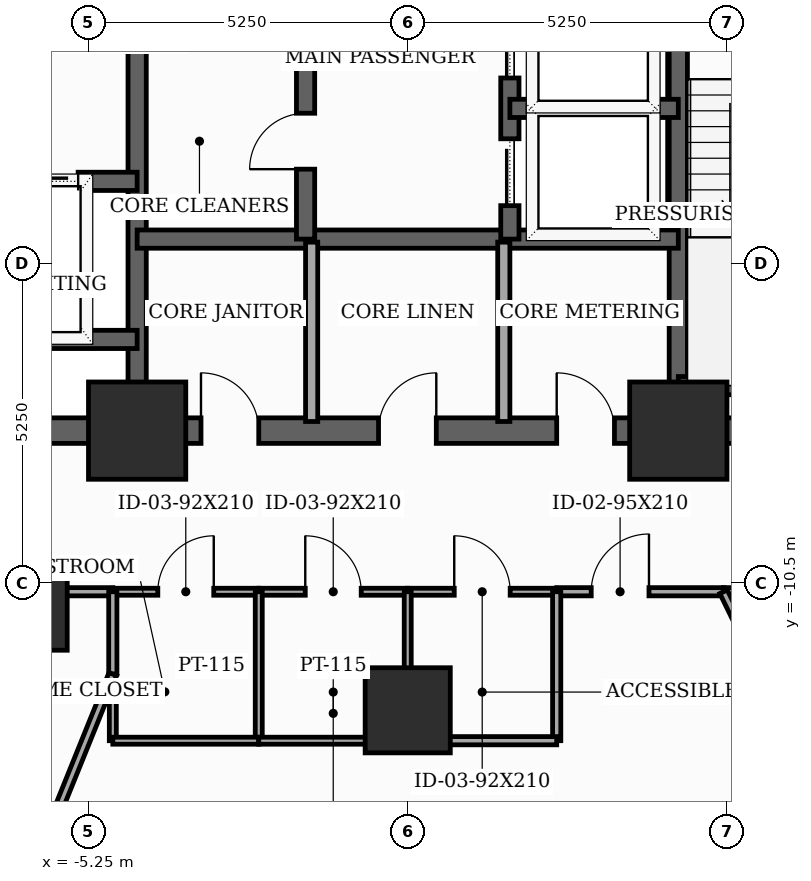
"""IFC4 building model, lengths in metres.
Left out: names, types, materials, properties, quantities, classifications, styles, units other than length and angle.
Written with IfcOpenShell. Run it as: python <this file> out.ifc"""

import sys

from ifc_helpers import new_model, si_unit, direction, frame, frame_2d, origin, origin_2d, place, context, subcontext, project, spatial, rectangle, extrude, element, fill, save


model = new_model("IFC4")
c1 = context("Model", 3, precision=1e-05, world=origin(), true_north=direction((0.0, 1.0)))
c2 = subcontext(c1, "Body", "Model", "MODEL_VIEW")
j1 = project(units=[si_unit("LENGTHUNIT", "METRE"), si_unit("PLANEANGLEUNIT", "RADIAN")], contexts=[c1])
p1 = place(None, origin())
s1 = spatial("IfcSite", under=j1, at=p1, CompositionType="ELEMENT")
p2 = place(p1, origin())
s2 = spatial("IfcBuilding", under=s1, at=p2, CompositionType="ELEMENT")
p3 = place(p2, frame((0.0, 0.0, 44.5)))
s3 = spatial("IfcBuildingStorey", under=s2, at=p3, CompositionType="ELEMENT", Elevation=44.5)
for number, where, z_axis, x_axis in (
    (1, (-4.45, -8.0, 0.0), (0.0, 0.0, 1.0), (1.0, 0.0, 0.0)),
    (2, (4.45, -8.0, 0.0), (0.0, 0.0, 1.0), (1.0, 0.0, 0.0)),
):
    element("IfcColumn", number, at=place(p3, frame(where, z_axis=z_axis, x_axis=x_axis)), inside=s3, PredefinedType="COLUMN", context=c2, shape_type="SweptSolid", body=[
        extrude(rectangle(XDim=1.6, YDim=1.6, at=origin_2d()), origin(), (0.0, 0.0, 1.0), 3.7),
    ])
for number, where, z_axis, x_axis in (
    (3, (-6.3, -10.912, 0.0), (0.0, 0.0, 1.0), (1.0, 0.0, 0.0)),
    (4, (0.0, -12.6, 0.0), (0.0, 0.0, 1.0), (1.0, 0.0, 0.0)),
):
    element("IfcColumn", number, at=place(p3, frame(where, z_axis=z_axis, x_axis=x_axis)), inside=s3, PredefinedType="COLUMN", context=c2, shape_type="SweptSolid", body=[
        extrude(rectangle(XDim=1.4, YDim=1.4, at=origin_2d()), origin(), (0.0, 0.0, 1.0), 3.7),
    ])
p4 = place(p3, frame((-8.0, -8.0, 0.0), z_axis=(0.0, 0.0, 1.0), x_axis=(1.0, 0.0, 0.0)))
e5 = element("IfcWall", 5, at=p4, inside=s3, PredefinedType="SHEAR", context=c2, shape_type="SweptSolid", body=[
    extrude(rectangle(XDim=16.0, YDim=0.42, at=frame_2d((8.0, 0.0))), origin(), (0.0, 0.0, 1.0), 3.5),
])
p5 = place(p4, frame((4.6, 0.0, 0.0)))
e6 = element("IfcOpeningElement", 6, at=p5, cuts=e5, PredefinedType="OPENING", context=c2, shape_type="SweptSolid", body=[
    extrude(rectangle(XDim=0.95, YDim=2.1, at=frame_2d((0.475, 1.05))), frame((0.0, 0.22, 0.0), z_axis=(0.0, -1.0, 0.0), x_axis=(1.0, 0.0, 0.0)), (0.0, 0.0, 1.0), 0.44),
])
p6 = place(p4, frame((7.52, 0.0, 0.0)))
e7 = element("IfcOpeningElement", 7, at=p6, cuts=e5, PredefinedType="OPENING", context=c2, shape_type="SweptSolid", body=[
    extrude(rectangle(XDim=0.95, YDim=2.1, at=frame_2d((0.475, 1.05))), frame((0.0, 0.22, 0.0), z_axis=(0.0, -1.0, 0.0), x_axis=(1.0, 0.0, 0.0)), (0.0, 0.0, 1.0), 0.44),
])
p7 = place(p4, frame((10.45, 0.0, 0.0)))
e8 = element("IfcOpeningElement", 8, at=p7, cuts=e5, PredefinedType="OPENING", context=c2, shape_type="SweptSolid", body=[
    extrude(rectangle(XDim=0.95, YDim=2.1, at=frame_2d((0.475, 1.05))), frame((0.0, 0.22, 0.0), z_axis=(0.0, -1.0, 0.0), x_axis=(1.0, 0.0, 0.0)), (0.0, 0.0, 1.0), 0.44),
])
for number, where, z_axis, x_axis in (
    (9, (-4.45, -7.79, 0.0), (0.0, 0.0, 1.0), (0.0, 1.0, 0.0)),
    (10, (4.45, -7.79, 0.0), (0.0, 0.0, 1.0), (0.0, 1.0, 0.0)),
):
    element("IfcWall", number, at=place(p3, frame(where, z_axis=z_axis, x_axis=x_axis)), inside=s3, PredefinedType="SHEAR", context=c2, shape_type="SweptSolid", body=[
        extrude(rectangle(XDim=15.58, YDim=0.3, at=frame_2d((7.79, 0.0))), origin(), (0.0, 0.0, 1.0), 3.5),
    ])
p8 = place(p3, frame((4.45, -7.26, 0.0), z_axis=(0.0, 0.0, 1.0), x_axis=(1.0, 0.0, 0.0)))
e11 = element("IfcWall", 11, at=p8, inside=s3, PredefinedType="SHEAR", context=c2, shape_type="SweptSolid", body=[
    extrude(rectangle(XDim=3.55, YDim=0.3, at=frame_2d((1.775, 0.0))), origin(), (0.0, 0.0, 1.0), 3.5),
])
p9 = place(p3, frame((-7.79, -3.9, 0.0), z_axis=(0.0, 0.0, 1.0), x_axis=(1.0, 0.0, 0.0)))
e12 = element("IfcWall", 12, at=p9, inside=s3, PredefinedType="SHEAR", context=c2, shape_type="SweptSolid", body=[
    extrude(rectangle(XDim=3.34, YDim=0.3, at=frame_2d((1.67, 0.0))), origin(), (0.0, 0.0, 1.0), 3.5),
])
p10 = place(p9, frame((1.27, 0.0, 0.0)))
e13 = element("IfcOpeningElement", 13, at=p10, cuts=e12, PredefinedType="OPENING", context=c2, shape_type="SweptSolid", body=[
    extrude(rectangle(XDim=1.1, YDim=2.1, at=frame_2d((0.55, 1.05))), frame((0.0, 0.16, 0.0), z_axis=(0.0, -1.0, 0.0), x_axis=(1.0, 0.0, 0.0)), (0.0, 0.0, 1.0), 0.32),
])
p11 = place(p3, frame((-7.79, -6.5, 0.0), z_axis=(0.0, 0.0, 1.0), x_axis=(1.0, 0.0, 0.0)))
e14 = element("IfcWall", 14, at=p11, inside=s3, PredefinedType="SHEAR", context=c2, shape_type="SweptSolid", body=[
    extrude(rectangle(XDim=3.34, YDim=0.3, at=frame_2d((1.67, 0.0))), origin(), (0.0, 0.0, 1.0), 3.5),
])
p12 = place(p3, frame((-4.45, -4.85, 0.0), z_axis=(0.0, 0.0, 1.0), x_axis=(1.0, 0.0, 0.0)))
e15 = element("IfcWall", 15, at=p12, inside=s3, PredefinedType="SHEAR", context=c2, shape_type="SweptSolid", body=[
    extrude(rectangle(XDim=8.9, YDim=0.3, at=frame_2d((4.45, 0.0))), origin(), (0.0, 0.0, 1.0), 3.5),
])
p13 = place(p3, frame((-1.68, -4.85, 0.0), z_axis=(0.0, 0.0, 1.0), x_axis=(0.0, 1.0, 0.0)))
e16 = element("IfcWall", 16, at=p13, inside=s3, PredefinedType="SHEAR", context=c2, shape_type="SweptSolid", body=[
    extrude(rectangle(XDim=12.64, YDim=0.3, at=frame_2d((6.32, 0.0))), origin(), (0.0, 0.0, 1.0), 3.5),
])
p14 = place(p13, frame((3.95, 0.0, 0.0)))
e17 = element("IfcOpeningElement", 17, at=p14, cuts=e16, PredefinedType="OPENING", context=c2, shape_type="SweptSolid", body=[
    extrude(rectangle(XDim=1.1, YDim=2.1, at=frame_2d((0.55, 1.05))), frame((0.0, 0.16, 0.0), z_axis=(0.0, -1.0, 0.0), x_axis=(1.0, 0.0, 0.0)), (0.0, 0.0, 1.0), 0.32),
])
p15 = place(p13, frame((6.25, 0.0, 0.0)))
e18 = element("IfcOpeningElement", 18, at=p15, cuts=e16, PredefinedType="OPENING", context=c2, shape_type="SweptSolid", body=[
    extrude(rectangle(XDim=1.1, YDim=2.1, at=frame_2d((0.55, 1.05))), frame((0.0, 0.16, 0.0), z_axis=(0.0, -1.0, 0.0), x_axis=(1.0, 0.0, 0.0)), (0.0, 0.0, 1.0), 0.32),
])
p16 = place(p13, frame((8.55, 0.0, 0.0)))
e19 = element("IfcOpeningElement", 19, at=p16, cuts=e16, PredefinedType="OPENING", context=c2, shape_type="SweptSolid", body=[
    extrude(rectangle(XDim=1.1, YDim=2.1, at=frame_2d((0.55, 1.05))), frame((0.0, 0.16, 0.0), z_axis=(0.0, -1.0, 0.0), x_axis=(1.0, 0.0, 0.0)), (0.0, 0.0, 1.0), 0.32),
])
p17 = place(p13, frame((10.85, 0.0, 0.0)))
e20 = element("IfcOpeningElement", 20, at=p17, cuts=e16, PredefinedType="OPENING", context=c2, shape_type="SweptSolid", body=[
    extrude(rectangle(XDim=1.1, YDim=2.1, at=frame_2d((0.55, 1.05))), frame((0.0, 0.16, 0.0), z_axis=(0.0, -1.0, 0.0), x_axis=(1.0, 0.0, 0.0)), (0.0, 0.0, 1.0), 0.32),
])
p18 = place(p13, frame((1.15, 0.0, 0.0)))
e21 = element("IfcOpeningElement", 21, at=p18, cuts=e16, PredefinedType="OPENING", context=c2, shape_type="SweptSolid", body=[
    extrude(rectangle(XDim=0.92, YDim=2.1, at=frame_2d((0.46, 1.05))), frame((0.0, 0.16, 0.0), z_axis=(0.0, -1.0, 0.0), x_axis=(1.0, 0.0, 0.0)), (0.0, 0.0, 1.0), 0.32),
])
p19 = place(p3, frame((1.68, -4.85, 0.0), z_axis=(0.0, 0.0, 1.0), x_axis=(0.0, 1.0, 0.0)))
e22 = element("IfcWall", 22, at=p19, inside=s3, PredefinedType="SHEAR", context=c2, shape_type="SweptSolid", body=[
    extrude(rectangle(XDim=12.64, YDim=0.3, at=frame_2d((6.32, 0.0))), origin(), (0.0, 0.0, 1.0), 3.5),
])
p20 = place(p19, frame((0.55, 0.0, 0.0)))
e23 = element("IfcOpeningElement", 23, at=p20, cuts=e22, PredefinedType="OPENING", context=c2, shape_type="SweptSolid", body=[
    extrude(rectangle(XDim=1.1, YDim=2.1, at=frame_2d((0.55, 1.05))), frame((0.0, 0.16, 0.0), z_axis=(0.0, -1.0, 0.0), x_axis=(1.0, 0.0, 0.0)), (0.0, 0.0, 1.0), 0.32),
])
p21 = place(p19, frame((2.65, 0.0, 0.0)))
e24 = element("IfcOpeningElement", 24, at=p21, cuts=e22, PredefinedType="OPENING", context=c2, shape_type="SweptSolid", body=[
    extrude(rectangle(XDim=1.1, YDim=2.1, at=frame_2d((0.55, 1.05))), frame((0.0, 0.16, 0.0), z_axis=(0.0, -1.0, 0.0), x_axis=(1.0, 0.0, 0.0)), (0.0, 0.0, 1.0), 0.32),
])
p22 = place(p19, frame((4.75, 0.0, 0.0)))
e25 = element("IfcOpeningElement", 25, at=p22, cuts=e22, PredefinedType="OPENING", context=c2, shape_type="SweptSolid", body=[
    extrude(rectangle(XDim=1.1, YDim=2.1, at=frame_2d((0.55, 1.05))), frame((0.0, 0.16, 0.0), z_axis=(0.0, -1.0, 0.0), x_axis=(1.0, 0.0, 0.0)), (0.0, 0.0, 1.0), 0.32),
])
p23 = place(p19, frame((6.85, 0.0, 0.0)))
e26 = element("IfcOpeningElement", 26, at=p23, cuts=e22, PredefinedType="OPENING", context=c2, shape_type="SweptSolid", body=[
    extrude(rectangle(XDim=1.1, YDim=2.1, at=frame_2d((0.55, 1.05))), frame((0.0, 0.16, 0.0), z_axis=(0.0, -1.0, 0.0), x_axis=(1.0, 0.0, 0.0)), (0.0, 0.0, 1.0), 0.32),
])
p24 = place(p19, frame((8.95, 0.0, 0.0)))
e27 = element("IfcOpeningElement", 27, at=p24, cuts=e22, PredefinedType="OPENING", context=c2, shape_type="SweptSolid", body=[
    extrude(rectangle(XDim=1.1, YDim=2.1, at=frame_2d((0.55, 1.05))), frame((0.0, 0.16, 0.0), z_axis=(0.0, -1.0, 0.0), x_axis=(1.0, 0.0, 0.0)), (0.0, 0.0, 1.0), 0.32),
])
p25 = place(p19, frame((11.05, 0.0, 0.0)))
e28 = element("IfcOpeningElement", 28, at=p25, cuts=e22, PredefinedType="OPENING", context=c2, shape_type="SweptSolid", body=[
    extrude(rectangle(XDim=1.1, YDim=2.1, at=frame_2d((0.55, 1.05))), frame((0.0, 0.16, 0.0), z_axis=(0.0, -1.0, 0.0), x_axis=(1.0, 0.0, 0.0)), (0.0, 0.0, 1.0), 0.32),
])
p26 = place(p3, frame((1.68, -2.7, 0.0), z_axis=(0.0, 0.0, 1.0), x_axis=(1.0, 0.0, 0.0)))
e29 = element("IfcWall", 29, at=p26, inside=s3, PredefinedType="SHEAR", context=c2, shape_type="SweptSolid", body=[
    extrude(rectangle(XDim=2.77, YDim=0.3, at=frame_2d((1.385, 0.0))), origin(), (0.0, 0.0, 1.0), 3.5),
])
for number, where, z_axis, x_axis in (
    (30, (-1.58, -7.85, 0.0), (0.0, 0.0, 1.0), (0.0, 1.0, 0.0)),
    (31, (1.58, -7.85, 0.0), (0.0, 0.0, 1.0), (0.0, 1.0, 0.0)),
):
    element("IfcWall", number, at=place(p3, frame(where, z_axis=z_axis, x_axis=x_axis)), inside=s3, PredefinedType="SOLIDWALL", context=c2, shape_type="SweptSolid", body=[
        extrude(rectangle(XDim=2.95, YDim=0.2, at=frame_2d((1.475, 0.0))), origin(), (0.0, 0.0, 1.0), 2.885),
    ])
p27 = place(p3, frame((-10.15, -10.65, 0.0), z_axis=(0.0, 0.0, 1.0), x_axis=(1.0, 0.0, 0.0)))
e32 = element("IfcWall", 32, at=p27, inside=s3, PredefinedType="PARTITIONING", context=c2, shape_type="SweptSolid", body=[
    extrude(rectangle(XDim=5.3, YDim=0.135, at=frame_2d((2.65, 0.0))), origin(), (0.0, 0.0, 1.0), 2.785),
])
p28 = place(p27, frame((0.585, 0.0, 0.0)))
e33 = element("IfcOpeningElement", 33, at=p28, cuts=e32, PredefinedType="OPENING", context=c2, shape_type="SweptSolid", body=[
    extrude(rectangle(XDim=0.95, YDim=2.1, at=frame_2d((0.475, 1.05))), frame((0.0, 0.077, 0.0), z_axis=(0.0, -1.0, 0.0), x_axis=(1.0, 0.0, 0.0)), (0.0, 0.0, 1.0), 0.155),
])
p29 = place(p3, frame((-4.85, -10.65, 0.0), z_axis=(0.0, 0.0, 1.0), x_axis=(1.0, 0.0, 0.0)))
e34 = element("IfcWall", 34, at=p29, inside=s3, PredefinedType="PARTITIONING", context=c2, shape_type="SweptSolid", body=[
    extrude(rectangle(XDim=2.4, YDim=0.115, at=frame_2d((1.2, 0.0))), origin(), (0.0, 0.0, 1.0), 3.5),
])
p30 = place(p29, frame((0.74, 0.0, 0.0)))
e35 = element("IfcOpeningElement", 35, at=p30, cuts=e34, PredefinedType="OPENING", context=c2, shape_type="SweptSolid", body=[
    extrude(rectangle(XDim=0.92, YDim=2.1, at=frame_2d((0.46, 1.05))), frame((0.0, 0.067, 0.0), z_axis=(0.0, -1.0, 0.0), x_axis=(1.0, 0.0, 0.0)), (0.0, 0.0, 1.0), 0.135),
])
p31 = place(p3, frame((-2.45, -10.65, 0.0), z_axis=(0.0, 0.0, 1.0), x_axis=(1.0, 0.0, 0.0)))
e36 = element("IfcWall", 36, at=p31, inside=s3, PredefinedType="PARTITIONING", context=c2, shape_type="SweptSolid", body=[
    extrude(rectangle(XDim=2.45, YDim=0.115, at=frame_2d((1.225, 0.0))), origin(), (0.0, 0.0, 1.0), 2.785),
])
p32 = place(p31, frame((0.765, 0.0, 0.0)))
e37 = element("IfcOpeningElement", 37, at=p32, cuts=e36, PredefinedType="OPENING", context=c2, shape_type="SweptSolid", body=[
    extrude(rectangle(XDim=0.92, YDim=2.1, at=frame_2d((0.46, 1.05))), frame((0.0, 0.067, 0.0), z_axis=(0.0, -1.0, 0.0), x_axis=(1.0, 0.0, 0.0)), (0.0, 0.0, 1.0), 0.135),
])
p33 = place(p3, frame((2.45, -10.65, 0.0), z_axis=(0.0, 0.0, 1.0), x_axis=(1.0, 0.0, 0.0)))
e38 = element("IfcWall", 38, at=p33, inside=s3, PredefinedType="PARTITIONING", context=c2, shape_type="SweptSolid", body=[
    extrude(rectangle(XDim=2.744, YDim=0.135, at=frame_2d((1.372, 0.0))), origin(), (0.0, 0.0, 1.0), 3.5),
])
p34 = place(p33, frame((0.568, 0.0, 0.0)))
e39 = element("IfcOpeningElement", 39, at=p34, cuts=e38, PredefinedType="OPENING", context=c2, shape_type="SweptSolid", body=[
    extrude(rectangle(XDim=0.95, YDim=2.1, at=frame_2d((0.475, 1.05))), frame((0.0, 0.077, 0.0), z_axis=(0.0, -1.0, 0.0), x_axis=(1.0, 0.0, 0.0)), (0.0, 0.0, 1.0), 0.155),
])
p35 = place(p3, frame((0.0, -10.65, 0.0), z_axis=(0.0, 0.0, 1.0), x_axis=(1.0, 0.0, 0.0)))
e40 = element("IfcWall", 40, at=p35, inside=s3, PredefinedType="PARTITIONING", context=c2, shape_type="SweptSolid", body=[
    extrude(rectangle(XDim=2.45, YDim=0.115, at=frame_2d((1.225, 0.0))), origin(), (0.0, 0.0, 1.0), 3.5),
])
p36 = place(p35, frame((0.765, 0.0, 0.0)))
e41 = element("IfcOpeningElement", 41, at=p36, cuts=e40, PredefinedType="OPENING", context=c2, shape_type="SweptSolid", body=[
    extrude(rectangle(XDim=0.92, YDim=2.1, at=frame_2d((0.46, 1.05))), frame((0.0, 0.067, 0.0), z_axis=(0.0, -1.0, 0.0), x_axis=(1.0, 0.0, 0.0)), (0.0, 0.0, 1.0), 0.135),
])
p37 = place(p3, frame((5.194, -10.65, 0.0), z_axis=(0.0, 0.0, 1.0), x_axis=(1.0, 0.0, 0.0)))
e42 = element("IfcWall", 42, at=p37, inside=s3, PredefinedType="PARTITIONING", context=c2, shape_type="SweptSolid", body=[
    extrude(rectangle(XDim=4.956, YDim=0.135, at=frame_2d((2.478, 0.0))), origin(), (0.0, 0.0, 1.0), 2.785),
])
p38 = place(p37, frame((3.49, 0.0, 0.0)))
e43 = element("IfcOpeningElement", 43, at=p38, cuts=e42, PredefinedType="OPENING", context=c2, shape_type="SweptSolid", body=[
    extrude(rectangle(XDim=0.95, YDim=2.1, at=frame_2d((0.475, 1.05))), frame((0.0, 0.077, 0.0), z_axis=(0.0, -1.0, 0.0), x_axis=(1.0, 0.0, 0.0)), (0.0, 0.0, 1.0), 0.155),
])
p39 = place(p3, frame((-4.85, -12.004, 0.0), z_axis=(0.0, 0.0, 1.0), x_axis=(0.0, 1.0, 0.0)))
e44 = element("IfcWall", 44, at=p39, inside=s3, PredefinedType="PARTITIONING", context=c2, shape_type="SweptSolid", body=[
    extrude(rectangle(XDim=1.354, YDim=0.135, at=frame_2d((0.677, 0.0))), origin(), (0.0, 0.0, 1.0), 2.785),
])
p40 = place(p3, frame((-5.897, -14.596, 0.0), z_axis=(0.0, 0.0, 1.0), x_axis=(0.374490485533, 0.92723075674, 0.0)))
e45 = element("IfcWall", 45, at=p40, inside=s3, PredefinedType="PARTITIONING", context=c2, shape_type="SweptSolid", body=[
    extrude(rectangle(XDim=2.795, YDim=0.135, at=frame_2d((1.398, 0.0))), origin(), (0.0, 0.0, 1.0), 2.685),
])
p41 = place(p3, frame((-2.45, -13.1, 0.0), z_axis=(0.0, 0.0, 1.0), x_axis=(0.0, 1.0, 0.0)))
e46 = element("IfcWall", 46, at=p41, inside=s3, PredefinedType="PARTITIONING", context=c2, shape_type="SweptSolid", body=[
    extrude(rectangle(XDim=2.45, YDim=0.115, at=frame_2d((1.225, 0.0))), origin(), (0.0, 0.0, 1.0), 2.785),
])
p42 = place(p3, frame((-4.85, -12.298, 0.0), z_axis=(0.0, 0.0, 1.0), x_axis=(0.0, -1.0, 0.0)))
e47 = element("IfcWall", 47, at=p42, inside=s3, PredefinedType="PARTITIONING", context=c2, shape_type="SweptSolid", body=[
    extrude(rectangle(XDim=0.802, YDim=0.115, at=frame_2d((0.401, 0.0))), origin(), (0.0, 0.0, 1.0), 3.5),
])
p43 = place(p3, frame((-4.85, -13.1, 0.0), z_axis=(0.0, 0.0, 1.0), x_axis=(1.0, 0.0, 0.0)))
e48 = element("IfcWall", 48, at=p43, inside=s3, PredefinedType="PARTITIONING", context=c2, shape_type="SweptSolid", body=[
    extrude(rectangle(XDim=2.4, YDim=0.115, at=frame_2d((1.2, 0.0))), origin(), (0.0, 0.0, 1.0), 3.5),
])
p44 = place(p3, frame((-2.45, -13.1, 0.0), z_axis=(0.0, 0.0, 1.0), x_axis=(1.0, 0.0, 0.0)))
e49 = element("IfcWall", 49, at=p44, inside=s3, PredefinedType="PARTITIONING", context=c2, shape_type="SweptSolid", body=[
    extrude(rectangle(XDim=2.45, YDim=0.115, at=frame_2d((1.225, 0.0))), origin(), (0.0, 0.0, 1.0), 3.5),
])
p45 = place(p3, frame((0.0, -13.1, 0.0), z_axis=(0.0, 0.0, 1.0), x_axis=(0.0, 1.0, 0.0)))
e50 = element("IfcWall", 50, at=p45, inside=s3, PredefinedType="PARTITIONING", context=c2, shape_type="SweptSolid", body=[
    extrude(rectangle(XDim=2.45, YDim=0.115, at=frame_2d((1.225, 0.0))), origin(), (0.0, 0.0, 1.0), 2.785),
])
p46 = place(p3, frame((2.45, -10.65, 0.0), z_axis=(0.0, 0.0, 1.0), x_axis=(0.0, -1.0, 0.0)))
e51 = element("IfcWall", 51, at=p46, inside=s3, PredefinedType="PARTITIONING", context=c2, shape_type="SweptSolid", body=[
    extrude(rectangle(XDim=2.45, YDim=0.135, at=frame_2d((1.225, 0.0))), origin(), (0.0, 0.0, 1.0), 2.785),
])
p47 = place(p3, frame((2.45, -13.1, 0.0), z_axis=(0.0, 0.0, 1.0), x_axis=(-1.0, 0.0, 0.0)))
e52 = element("IfcWall", 52, at=p47, inside=s3, PredefinedType="PARTITIONING", context=c2, shape_type="SweptSolid", body=[
    extrude(rectangle(XDim=2.45, YDim=0.135, at=frame_2d((1.225, 0.0))), origin(), (0.0, 0.0, 1.0), 3.5),
])
p48 = place(p3, frame((7.077, -14.51, 0.0), z_axis=(0.0, 0.0, 1.0), x_axis=(-0.438392272504, 0.898783742292, 0.0)))
e53 = element("IfcWall", 53, at=p48, inside=s3, PredefinedType="PARTITIONING", context=c2, shape_type="SweptSolid", body=[
    extrude(rectangle(XDim=4.295, YDim=0.135, at=frame_2d((2.147, 0.0))), origin(), (0.0, 0.0, 1.0), 2.685),
])
p49 = place(p5, origin())
e54 = element("IfcDoor", 54, at=p49, inside=s3, OperationType="SINGLE_SWING_LEFT", PredefinedType="DOOR", context=c2, shape_type="SweptSolid", body=[
    extrude(rectangle(XDim=0.95, YDim=2.1, at=frame_2d((0.475, 1.05))), frame((0.0, 0.025, 0.0), z_axis=(0.0, -1.0, 0.0), x_axis=(1.0, 0.0, 0.0)), (0.0, 0.0, 1.0), 0.05),
])
fill(e6, e54)
p50 = place(p6, origin())
e55 = element("IfcDoor", 55, at=p50, inside=s3, OperationType="SINGLE_SWING_RIGHT", PredefinedType="DOOR", context=c2, shape_type="SweptSolid", body=[
    extrude(rectangle(XDim=0.95, YDim=2.1, at=frame_2d((0.475, 1.05))), frame((0.0, 0.025, 0.0), z_axis=(0.0, -1.0, 0.0), x_axis=(1.0, 0.0, 0.0)), (0.0, 0.0, 1.0), 0.05),
])
fill(e7, e55)
p51 = place(p7, origin())
e56 = element("IfcDoor", 56, at=p51, inside=s3, OperationType="SINGLE_SWING_LEFT", PredefinedType="DOOR", context=c2, shape_type="SweptSolid", body=[
    extrude(rectangle(XDim=0.95, YDim=2.1, at=frame_2d((0.475, 1.05))), frame((0.0, 0.025, 0.0), z_axis=(0.0, -1.0, 0.0), x_axis=(1.0, 0.0, 0.0)), (0.0, 0.0, 1.0), 0.05),
])
fill(e8, e56)
p52 = place(p10, origin())
e57 = element("IfcDoor", 57, at=p52, inside=s3, OperationType="SLIDING_TO_LEFT", PredefinedType="DOOR", context=c2, shape_type="SweptSolid", body=[
    extrude(rectangle(XDim=1.1, YDim=2.1, at=frame_2d((0.55, 1.05))), frame((0.0, 0.025, 0.0), z_axis=(0.0, -1.0, 0.0), x_axis=(1.0, 0.0, 0.0)), (0.0, 0.0, 1.0), 0.05),
])
fill(e13, e57)
p53 = place(p18, origin())
e58 = element("IfcDoor", 58, at=p53, inside=s3, OperationType="SINGLE_SWING_LEFT", PredefinedType="DOOR", context=c2, shape_type="SweptSolid", body=[
    extrude(rectangle(XDim=0.92, YDim=2.1, at=frame_2d((0.46, 1.05))), frame((0.0, 0.025, 0.0), z_axis=(0.0, -1.0, 0.0), x_axis=(1.0, 0.0, 0.0)), (0.0, 0.0, 1.0), 0.05),
])
fill(e21, e58)
p54 = place(p20, origin())
e59 = element("IfcDoor", 59, at=p54, inside=s3, OperationType="SLIDING_TO_LEFT", PredefinedType="DOOR", context=c2, shape_type="SweptSolid", body=[
    extrude(rectangle(XDim=1.1, YDim=2.1, at=frame_2d((0.55, 1.05))), frame((0.0, 0.025, 0.0), z_axis=(0.0, -1.0, 0.0), x_axis=(1.0, 0.0, 0.0)), (0.0, 0.0, 1.0), 0.05),
])
fill(e23, e59)
p55 = place(p21, origin())
e60 = element("IfcDoor", 60, at=p55, inside=s3, OperationType="SLIDING_TO_LEFT", PredefinedType="DOOR", context=c2, shape_type="SweptSolid", body=[
    extrude(rectangle(XDim=1.1, YDim=2.1, at=frame_2d((0.55, 1.05))), frame((0.0, 0.025, 0.0), z_axis=(0.0, -1.0, 0.0), x_axis=(1.0, 0.0, 0.0)), (0.0, 0.0, 1.0), 0.05),
])
fill(e24, e60)
p56 = place(p30, origin())
e61 = element("IfcDoor", 61, at=p56, inside=s3, OperationType="SINGLE_SWING_RIGHT", PredefinedType="DOOR", context=c2, shape_type="SweptSolid", body=[
    extrude(rectangle(XDim=0.92, YDim=2.1, at=frame_2d((0.46, 1.05))), frame((0.0, 0.025, 0.0), z_axis=(0.0, -1.0, 0.0), x_axis=(1.0, 0.0, 0.0)), (0.0, 0.0, 1.0), 0.05),
])
fill(e35, e61)
p57 = place(p32, origin())
e62 = element("IfcDoor", 62, at=p57, inside=s3, OperationType="SINGLE_SWING_LEFT", PredefinedType="DOOR", context=c2, shape_type="SweptSolid", body=[
    extrude(rectangle(XDim=0.92, YDim=2.1, at=frame_2d((0.46, 1.05))), frame((0.0, 0.025, 0.0), z_axis=(0.0, -1.0, 0.0), x_axis=(1.0, 0.0, 0.0)), (0.0, 0.0, 1.0), 0.05),
])
fill(e37, e62)
p58 = place(p34, origin())
e63 = element("IfcDoor", 63, at=p58, inside=s3, OperationType="SINGLE_SWING_RIGHT", PredefinedType="DOOR", context=c2, shape_type="SweptSolid", body=[
    extrude(rectangle(XDim=0.95, YDim=2.1, at=frame_2d((0.475, 1.05))), frame((0.0, 0.025, 0.0), z_axis=(0.0, -1.0, 0.0), x_axis=(1.0, 0.0, 0.0)), (0.0, 0.0, 1.0), 0.05),
])
fill(e39, e63)
p59 = place(p36, origin())
e64 = element("IfcDoor", 64, at=p59, inside=s3, OperationType="SINGLE_SWING_LEFT", PredefinedType="DOOR", context=c2, shape_type="SweptSolid", body=[
    extrude(rectangle(XDim=0.92, YDim=2.1, at=frame_2d((0.46, 1.05))), frame((0.0, 0.025, 0.0), z_axis=(0.0, -1.0, 0.0), x_axis=(1.0, 0.0, 0.0)), (0.0, 0.0, 1.0), 0.05),
])
fill(e41, e64)
save(model, sys.argv[1])
